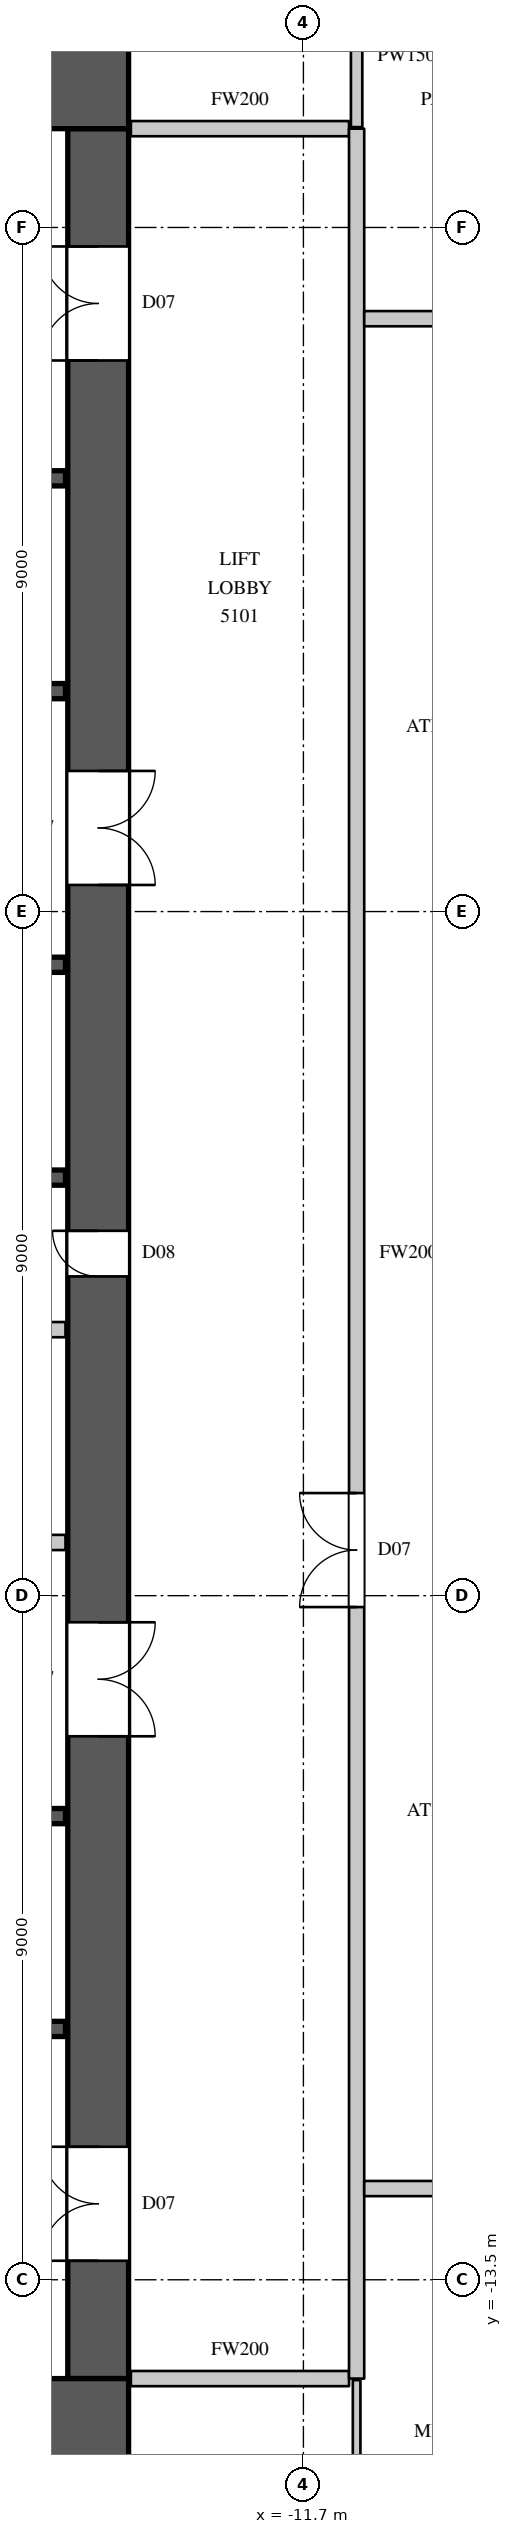
"""IFC4 building model, lengths in metres.
Left out: names, types, materials, properties, quantities, classifications, styles, units other than length and angle.
Written with IfcOpenShell. Run it as: python <this file> out.ifc"""

import sys

from ifc_helpers import new_model, si_unit, direction, frame, frame_2d, origin, place, context, subcontext, project, spatial, rectangle, extrude, element, fill, save


model = new_model("IFC4")
c1 = context("Model", 3, precision=1e-05, world=origin(), true_north=direction((0.0, 1.0)))
c2 = subcontext(c1, "Body", "Model", "MODEL_VIEW")
j1 = project(units=[si_unit("LENGTHUNIT", "METRE"), si_unit("PLANEANGLEUNIT", "RADIAN")], contexts=[c1])
p1 = place(None, origin())
s1 = spatial("IfcSite", under=j1, at=p1, CompositionType="ELEMENT")
p2 = place(p1, origin())
s2 = spatial("IfcBuilding", under=s1, at=p2, CompositionType="ELEMENT")
p3 = place(p2, frame((0.0, 0.0, 230.2)))
s3 = spatial("IfcBuildingStorey", under=s2, at=p3, CompositionType="ELEMENT", Elevation=230.2)
for number, where, z_axis, x_axis in (
    (1, (-30.0, 15.4, 0.0), (0.0, 0.0, 1.0), (1.0, 0.0, 0.0)),
    (2, (-30.0, -15.4, 0.0), (0.0, 0.0, 1.0), (1.0, 0.0, 0.0)),
):
    element("IfcWall", number, at=place(p3, frame(where, z_axis=z_axis, x_axis=x_axis)), inside=s3, PredefinedType="SHEAR", context=c2, shape_type="SweptSolid", body=[
        extrude(rectangle(XDim=16.0, YDim=1.2, at=frame_2d((8.0, 0.0))), origin(), (0.0, 0.0, 1.0), 4.1),
    ])
p4 = place(p3, frame((-14.4, -14.8, 0.0), z_axis=(0.0, 0.0, 1.0), x_axis=(0.0, 1.0, 0.0)))
e3 = element("IfcWall", 3, at=p4, inside=s3, PredefinedType="SHEAR", context=c2, shape_type="SweptSolid", body=[
    extrude(rectangle(XDim=29.6, YDim=0.8, at=frame_2d((14.8, 0.0))), origin(), (0.0, 0.0, 1.0), 4.1),
])
p5 = place(p4, frame((1.55, 0.0, 0.0)))
e4 = element("IfcOpeningElement", 4, at=p5, cuts=e3, PredefinedType="OPENING", context=c2, shape_type="SweptSolid", body=[
    extrude(rectangle(XDim=1.5, YDim=2.4, at=frame_2d((0.75, 1.2))), frame((0.0, 0.41, 0.0), z_axis=(0.0, -1.0, 0.0), x_axis=(1.0, 0.0, 0.0)), (0.0, 0.0, 1.0), 0.82),
])
p6 = place(p4, frame((26.55, 0.0, 0.0)))
e5 = element("IfcOpeningElement", 5, at=p6, cuts=e3, PredefinedType="OPENING", context=c2, shape_type="SweptSolid", body=[
    extrude(rectangle(XDim=1.5, YDim=2.4, at=frame_2d((0.75, 1.2))), frame((0.0, 0.41, 0.0), z_axis=(0.0, -1.0, 0.0), x_axis=(1.0, 0.0, 0.0)), (0.0, 0.0, 1.0), 0.82),
])
p7 = place(p4, frame((8.45, 0.0, 0.0)))
e6 = element("IfcOpeningElement", 6, at=p7, cuts=e3, PredefinedType="OPENING", context=c2, shape_type="SweptSolid", body=[
    extrude(rectangle(XDim=1.5, YDim=2.4, at=frame_2d((0.75, 1.2))), frame((0.0, 0.41, 0.0), z_axis=(0.0, -1.0, 0.0), x_axis=(1.0, 0.0, 0.0)), (0.0, 0.0, 1.0), 0.82),
])
p8 = place(p4, frame((19.65, 0.0, 0.0)))
e7 = element("IfcOpeningElement", 7, at=p8, cuts=e3, PredefinedType="OPENING", context=c2, shape_type="SweptSolid", body=[
    extrude(rectangle(XDim=1.5, YDim=2.4, at=frame_2d((0.75, 1.2))), frame((0.0, 0.41, 0.0), z_axis=(0.0, -1.0, 0.0), x_axis=(1.0, 0.0, 0.0)), (0.0, 0.0, 1.0), 0.82),
])
p9 = place(p4, frame((14.5, 0.0, 0.0)))
e8 = element("IfcOpeningElement", 8, at=p9, cuts=e3, PredefinedType="OPENING", context=c2, shape_type="SweptSolid", body=[
    extrude(rectangle(XDim=0.6, YDim=2.0, at=frame_2d((0.3, 1.0))), frame((0.0, 0.41, 0.0), z_axis=(0.0, -1.0, 0.0), x_axis=(1.0, 0.0, 0.0)), (0.0, 0.0, 1.0), 0.82),
])
p10 = place(p3, frame((-18.18, -3.8, 0.0), z_axis=(0.0, 0.0, 1.0), x_axis=(1.0, 0.0, 0.0)))
e9 = element("IfcWall", 9, at=p10, inside=s3, PredefinedType="PARTITIONING", context=c2, shape_type="SweptSolid", body=[
    extrude(rectangle(XDim=3.35, YDim=0.2, at=frame_2d((1.675, 0.0))), origin(), (0.0, 0.0, 1.0), 3.8),
])
p11 = place(p10, frame((1.2, 0.0, 0.0)))
e10 = element("IfcOpeningElement", 10, at=p11, cuts=e9, PredefinedType="OPENING", context=c2, shape_type="SweptSolid", body=[
    extrude(rectangle(XDim=0.9, YDim=2.2, at=frame_2d((0.45, 1.1))), frame((0.0, 0.11, 0.0), z_axis=(0.0, -1.0, 0.0), x_axis=(1.0, 0.0, 0.0)), (0.0, 0.0, 1.0), 0.22),
])
for number, where, z_axis, x_axis in (
    (11, (-13.97, -14.8, 0.0), (0.0, 0.0, 1.0), (1.0, 0.0, 0.0)),
    (12, (-13.97, 14.8, 0.0), (0.0, 0.0, 1.0), (1.0, 0.0, 0.0)),
):
    element("IfcWall", number, at=place(p3, frame(where, z_axis=z_axis, x_axis=x_axis)), inside=s3, PredefinedType="PARTITIONING", context=c2, shape_type="SweptSolid", body=[
        extrude(rectangle(XDim=2.87, YDim=0.2, at=frame_2d((1.435, 0.0))), origin(), (0.0, 0.0, 1.0), 3.8),
    ])
p12 = place(p3, frame((-11.0, -14.8, 0.0), z_axis=(0.0, 0.0, 1.0), x_axis=(0.0, 1.0, 0.0)))
e13 = element("IfcWall", 13, at=p12, inside=s3, PredefinedType="PARTITIONING", context=c2, shape_type="SweptSolid", body=[
    extrude(rectangle(XDim=29.6, YDim=0.2, at=frame_2d((14.8, 0.0))), origin(), (0.0, 0.0, 1.0), 3.8),
])
p13 = place(p12, frame((10.15, 0.0, 0.0)))
e14 = element("IfcOpeningElement", 14, at=p13, cuts=e13, PredefinedType="OPENING", context=c2, shape_type="SweptSolid", body=[
    extrude(rectangle(XDim=1.5, YDim=2.4, at=frame_2d((0.75, 1.2))), frame((0.0, 0.11, 0.0), z_axis=(0.0, -1.0, 0.0), x_axis=(1.0, 0.0, 0.0)), (0.0, 0.0, 1.0), 0.22),
])
p14 = place(p3, frame((-10.9, -12.3, 0.0), z_axis=(0.0, 0.0, 1.0), x_axis=(1.0, 0.0, 0.0)))
e15 = element("IfcWall", 15, at=p14, inside=s3, PredefinedType="PARTITIONING", context=c2, shape_type="SweptSolid", body=[
    extrude(rectangle(XDim=22.1, YDim=0.2, at=frame_2d((11.05, 0.0))), origin(), (0.0, 0.0, 1.0), 3.8),
])
p15 = place(p14, frame((1.1, 0.0, 0.0)))
e16 = element("IfcOpeningElement", 16, at=p15, cuts=e15, PredefinedType="OPENING", context=c2, shape_type="SweptSolid", body=[
    extrude(rectangle(XDim=0.9, YDim=2.2, at=frame_2d((0.45, 1.1))), frame((0.0, 0.11, 0.0), z_axis=(0.0, -1.0, 0.0), x_axis=(1.0, 0.0, 0.0)), (0.0, 0.0, 1.0), 0.22),
])
p16 = place(p14, frame((4.9, 0.0, 0.0)))
e17 = element("IfcOpeningElement", 17, at=p16, cuts=e15, PredefinedType="OPENING", context=c2, shape_type="SweptSolid", body=[
    extrude(rectangle(XDim=0.9, YDim=2.2, at=frame_2d((0.45, 1.1))), frame((0.0, 0.11, 0.0), z_axis=(0.0, -1.0, 0.0), x_axis=(1.0, 0.0, 0.0)), (0.0, 0.0, 1.0), 0.22),
])
p17 = place(p14, frame((7.55, 0.0, 0.0)))
e18 = element("IfcOpeningElement", 18, at=p17, cuts=e15, PredefinedType="OPENING", context=c2, shape_type="SweptSolid", body=[
    extrude(rectangle(XDim=0.9, YDim=2.2, at=frame_2d((0.45, 1.1))), frame((0.0, 0.11, 0.0), z_axis=(0.0, -1.0, 0.0), x_axis=(1.0, 0.0, 0.0)), (0.0, 0.0, 1.0), 0.22),
])
p18 = place(p14, frame((9.95, 0.0, 0.0)))
e19 = element("IfcOpeningElement", 19, at=p18, cuts=e15, PredefinedType="OPENING", context=c2, shape_type="SweptSolid", body=[
    extrude(rectangle(XDim=1.1, YDim=2.4, at=frame_2d((0.55, 1.2))), frame((0.0, 0.11, 0.0), z_axis=(0.0, -1.0, 0.0), x_axis=(1.0, 0.0, 0.0)), (0.0, 0.0, 1.0), 0.22),
])
p19 = place(p14, frame((14.4, 0.0, 0.0)))
e20 = element("IfcOpeningElement", 20, at=p19, cuts=e15, PredefinedType="OPENING", context=c2, shape_type="SweptSolid", body=[
    extrude(rectangle(XDim=1.1, YDim=2.4, at=frame_2d((0.55, 1.2))), frame((0.0, 0.11, 0.0), z_axis=(0.0, -1.0, 0.0), x_axis=(1.0, 0.0, 0.0)), (0.0, 0.0, 1.0), 0.22),
])
p20 = place(p14, frame((17.95, 0.0, 0.0)))
e21 = element("IfcOpeningElement", 21, at=p20, cuts=e15, PredefinedType="OPENING", context=c2, shape_type="SweptSolid", body=[
    extrude(rectangle(XDim=1.1, YDim=2.4, at=frame_2d((0.55, 1.2))), frame((0.0, 0.11, 0.0), z_axis=(0.0, -1.0, 0.0), x_axis=(1.0, 0.0, 0.0)), (0.0, 0.0, 1.0), 0.22),
])
p21 = place(p3, frame((-10.9, 12.3, 0.0), z_axis=(0.0, 0.0, 1.0), x_axis=(1.0, 0.0, 0.0)))
e22 = element("IfcWall", 22, at=p21, inside=s3, PredefinedType="PARTITIONING", context=c2, shape_type="SweptSolid", body=[
    extrude(rectangle(XDim=3.735, YDim=0.2, at=frame_2d((1.867, 0.0))), origin(), (0.0, 0.0, 1.0), 3.8),
])
p22 = place(p21, frame((1.7, 0.0, 0.0)))
e23 = element("IfcOpeningElement", 23, at=p22, cuts=e22, PredefinedType="OPENING", context=c2, shape_type="SweptSolid", body=[
    extrude(rectangle(XDim=1.1, YDim=2.4, at=frame_2d((0.55, 1.2))), frame((0.0, 0.11, 0.0), z_axis=(0.0, -1.0, 0.0), x_axis=(1.0, 0.0, 0.0)), (0.0, 0.0, 1.0), 0.22),
])
p23 = place(p3, frame((-11.0, 14.82, 0.0), z_axis=(0.0, 0.0, 1.0), x_axis=(0.0, 1.0, 0.0)))
e24 = element("IfcWall", 24, at=p23, inside=s3, PredefinedType="PARTITIONING", context=c2, shape_type="SweptSolid", body=[
    extrude(rectangle(XDim=1.88, YDim=0.15, at=frame_2d((0.94, 0.0))), origin(), (0.0, 0.0, 1.0), 3.8),
])
p24 = place(p3, frame((-29.17, -1.0, 0.0), z_axis=(0.0, 0.0, 1.0), x_axis=(1.0, 0.0, 0.0)))
e25 = element("IfcWall", 25, at=p24, inside=s3, PredefinedType="PARTITIONING", context=c2, shape_type="SweptSolid", body=[
    extrude(rectangle(XDim=14.34, YDim=0.2, at=frame_2d((7.17, 0.0))), origin(), (0.0, 0.0, 1.0), 3.8),
])
p25 = place(p3, frame((-26.08, 1.0, 0.0), z_axis=(0.0, 0.0, 1.0), x_axis=(1.0, 0.0, 0.0)))
e26 = element("IfcWall", 26, at=p25, inside=s3, PredefinedType="SHEAR", context=c2, shape_type="SweptSolid", body=[
    extrude(rectangle(XDim=11.25, YDim=0.2, at=frame_2d((5.625, 0.0))), origin(), (0.0, 0.0, 1.0), 3.8),
])
p26 = place(p3, frame((-26.08, 3.8, 0.0), z_axis=(0.0, 0.0, 1.0), x_axis=(1.0, 0.0, 0.0)))
e27 = element("IfcWall", 27, at=p26, inside=s3, PredefinedType="SHEAR", context=c2, shape_type="SweptSolid", body=[
    extrude(rectangle(XDim=11.25, YDim=0.2, at=frame_2d((5.625, 0.0))), origin(), (0.0, 0.0, 1.0), 3.8),
])
p27 = place(p26, frame((0.8, 0.0, 0.0)))
e28 = element("IfcOpeningElement", 28, at=p27, cuts=e27, PredefinedType="OPENING", context=c2, shape_type="SweptSolid", body=[
    extrude(rectangle(XDim=1.1, YDim=2.2, at=frame_2d((0.55, 1.1))), frame((0.0, 0.11, 0.0), z_axis=(0.0, -1.0, 0.0), x_axis=(1.0, 0.0, 0.0)), (0.0, 0.0, 1.0), 0.22),
])
p28 = place(p26, frame((3.55, 0.0, 0.0)))
e29 = element("IfcOpeningElement", 29, at=p28, cuts=e27, PredefinedType="OPENING", context=c2, shape_type="SweptSolid", body=[
    extrude(rectangle(XDim=1.1, YDim=2.2, at=frame_2d((0.55, 1.1))), frame((0.0, 0.11, 0.0), z_axis=(0.0, -1.0, 0.0), x_axis=(1.0, 0.0, 0.0)), (0.0, 0.0, 1.0), 0.22),
])
p29 = place(p26, frame((6.25, 0.0, 0.0)))
e30 = element("IfcOpeningElement", 30, at=p29, cuts=e27, PredefinedType="OPENING", context=c2, shape_type="SweptSolid", body=[
    extrude(rectangle(XDim=1.1, YDim=2.2, at=frame_2d((0.55, 1.1))), frame((0.0, 0.11, 0.0), z_axis=(0.0, -1.0, 0.0), x_axis=(1.0, 0.0, 0.0)), (0.0, 0.0, 1.0), 0.22),
])
p30 = place(p26, frame((9.15, 0.0, 0.0)))
e31 = element("IfcOpeningElement", 31, at=p30, cuts=e27, PredefinedType="OPENING", context=c2, shape_type="SweptSolid", body=[
    extrude(rectangle(XDim=1.1, YDim=2.2, at=frame_2d((0.55, 1.1))), frame((0.0, 0.11, 0.0), z_axis=(0.0, -1.0, 0.0), x_axis=(1.0, 0.0, 0.0)), (0.0, 0.0, 1.0), 0.22),
])
p31 = place(p3, frame((-17.92, -10.2, 0.0), z_axis=(0.0, 0.0, 1.0), x_axis=(1.0, 0.0, 0.0)))
e32 = element("IfcWall", 32, at=p31, inside=s3, PredefinedType="SHEAR", context=c2, shape_type="SweptSolid", body=[
    extrude(rectangle(XDim=3.09, YDim=0.2, at=frame_2d((1.545, 0.0))), origin(), (0.0, 0.0, 1.0), 3.8),
])
p32 = place(p31, frame((1.0, 0.0, 0.0)))
e33 = element("IfcOpeningElement", 33, at=p32, cuts=e32, PredefinedType="OPENING", context=c2, shape_type="SweptSolid", body=[
    extrude(rectangle(XDim=1.1, YDim=2.2, at=frame_2d((0.55, 1.1))), frame((0.0, 0.11, 0.0), z_axis=(0.0, -1.0, 0.0), x_axis=(1.0, 0.0, 0.0)), (0.0, 0.0, 1.0), 0.22),
])
p33 = place(p3, frame((-17.9, -7.4, 0.0), z_axis=(0.0, 0.0, 1.0), x_axis=(1.0, 0.0, 0.0)))
e34 = element("IfcWall", 34, at=p33, inside=s3, PredefinedType="SHEAR", context=c2, shape_type="SweptSolid", body=[
    extrude(rectangle(XDim=3.07, YDim=0.2, at=frame_2d((1.535, 0.0))), origin(), (0.0, 0.0, 1.0), 3.8),
])
p34 = place(p3, frame((-17.92, 7.4, 0.0), z_axis=(0.0, 0.0, 1.0), x_axis=(1.0, 0.0, 0.0)))
e35 = element("IfcWall", 35, at=p34, inside=s3, PredefinedType="SHEAR", context=c2, shape_type="SweptSolid", body=[
    extrude(rectangle(XDim=3.09, YDim=0.2, at=frame_2d((1.545, 0.0))), origin(), (0.0, 0.0, 1.0), 3.8),
])
p35 = place(p3, frame((-17.92, 10.2, 0.0), z_axis=(0.0, 0.0, 1.0), x_axis=(1.0, 0.0, 0.0)))
e36 = element("IfcWall", 36, at=p35, inside=s3, PredefinedType="SHEAR", context=c2, shape_type="SweptSolid", body=[
    extrude(rectangle(XDim=3.09, YDim=0.2, at=frame_2d((1.545, 0.0))), origin(), (0.0, 0.0, 1.0), 3.8),
])
p36 = place(p35, frame((1.0, 0.0, 0.0)))
e37 = element("IfcOpeningElement", 37, at=p36, cuts=e36, PredefinedType="OPENING", context=c2, shape_type="SweptSolid", body=[
    extrude(rectangle(XDim=1.1, YDim=2.2, at=frame_2d((0.55, 1.1))), frame((0.0, 0.11, 0.0), z_axis=(0.0, -1.0, 0.0), x_axis=(1.0, 0.0, 0.0)), (0.0, 0.0, 1.0), 0.22),
])
p37 = place(p3, frame((-11.0, -16.7, 0.0), z_axis=(0.0, 0.0, 1.0), x_axis=(0.0, 1.0, 0.0)))
e38 = element("IfcWall", 38, at=p37, inside=s3, PredefinedType="PARTITIONING", context=c2, shape_type="SweptSolid", body=[
    extrude(rectangle(XDim=1.88, YDim=0.1, at=frame_2d((0.94, 0.0))), origin(), (0.0, 0.0, 1.0), 3.8),
])
p38 = place(p13, origin())
e39 = element("IfcDoor", 39, at=p38, inside=s3, OperationType="DOUBLE_DOOR_SINGLE_SWING", PredefinedType="DOOR", context=c2, shape_type="SweptSolid", body=[
    extrude(rectangle(XDim=1.5, YDim=2.4, at=frame_2d((0.75, 1.2))), frame((0.0, 0.025, 0.0), z_axis=(0.0, -1.0, 0.0), x_axis=(1.0, 0.0, 0.0)), (0.0, 0.0, 1.0), 0.05),
])
fill(e14, e39)
p39 = place(p5, origin())
e40 = element("IfcDoor", 40, at=p39, inside=s3, OperationType="DOUBLE_DOOR_SINGLE_SWING", PredefinedType="DOOR", context=c2, shape_type="SweptSolid", body=[
    extrude(rectangle(XDim=1.5, YDim=2.4, at=frame_2d((0.75, 1.2))), frame((0.0, 0.395, 0.0), z_axis=(0.0, -1.0, 0.0), x_axis=(1.0, 0.0, 0.0)), (0.0, 0.0, 1.0), 0.05),
])
fill(e4, e40)
p40 = place(p6, origin())
e41 = element("IfcDoor", 41, at=p40, inside=s3, OperationType="DOUBLE_DOOR_SINGLE_SWING", PredefinedType="DOOR", context=c2, shape_type="SweptSolid", body=[
    extrude(rectangle(XDim=1.5, YDim=2.4, at=frame_2d((0.75, 1.2))), frame((0.0, 0.395, 0.0), z_axis=(0.0, -1.0, 0.0), x_axis=(1.0, 0.0, 0.0)), (0.0, 0.0, 1.0), 0.05),
])
fill(e5, e41)
p41 = place(p7, origin())
e42 = element("IfcDoor", 42, at=p41, inside=s3, OperationType="DOUBLE_DOOR_SINGLE_SWING", PredefinedType="DOOR", context=c2, shape_type="SweptSolid", body=[
    extrude(rectangle(XDim=1.5, YDim=2.4, at=frame_2d((0.75, 1.2))), frame((0.0, -0.345, 0.0), z_axis=(0.0, -1.0, 0.0), x_axis=(1.0, 0.0, 0.0)), (0.0, 0.0, 1.0), 0.05),
])
fill(e6, e42)
p42 = place(p8, origin())
e43 = element("IfcDoor", 43, at=p42, inside=s3, OperationType="DOUBLE_DOOR_SINGLE_SWING", PredefinedType="DOOR", context=c2, shape_type="SweptSolid", body=[
    extrude(rectangle(XDim=1.5, YDim=2.4, at=frame_2d((0.75, 1.2))), frame((0.0, -0.345, 0.0), z_axis=(0.0, -1.0, 0.0), x_axis=(1.0, 0.0, 0.0)), (0.0, 0.0, 1.0), 0.05),
])
fill(e7, e43)
p43 = place(p9, origin())
e44 = element("IfcDoor", 44, at=p43, inside=s3, OperationType="SINGLE_SWING_RIGHT", PredefinedType="DOOR", context=c2, shape_type="SweptSolid", body=[
    extrude(rectangle(XDim=0.6, YDim=2.0, at=frame_2d((0.3, 1.0))), frame((0.0, 0.395, 0.0), z_axis=(0.0, -1.0, 0.0), x_axis=(1.0, 0.0, 0.0)), (0.0, 0.0, 1.0), 0.05),
])
fill(e8, e44)
save(model, sys.argv[1])
